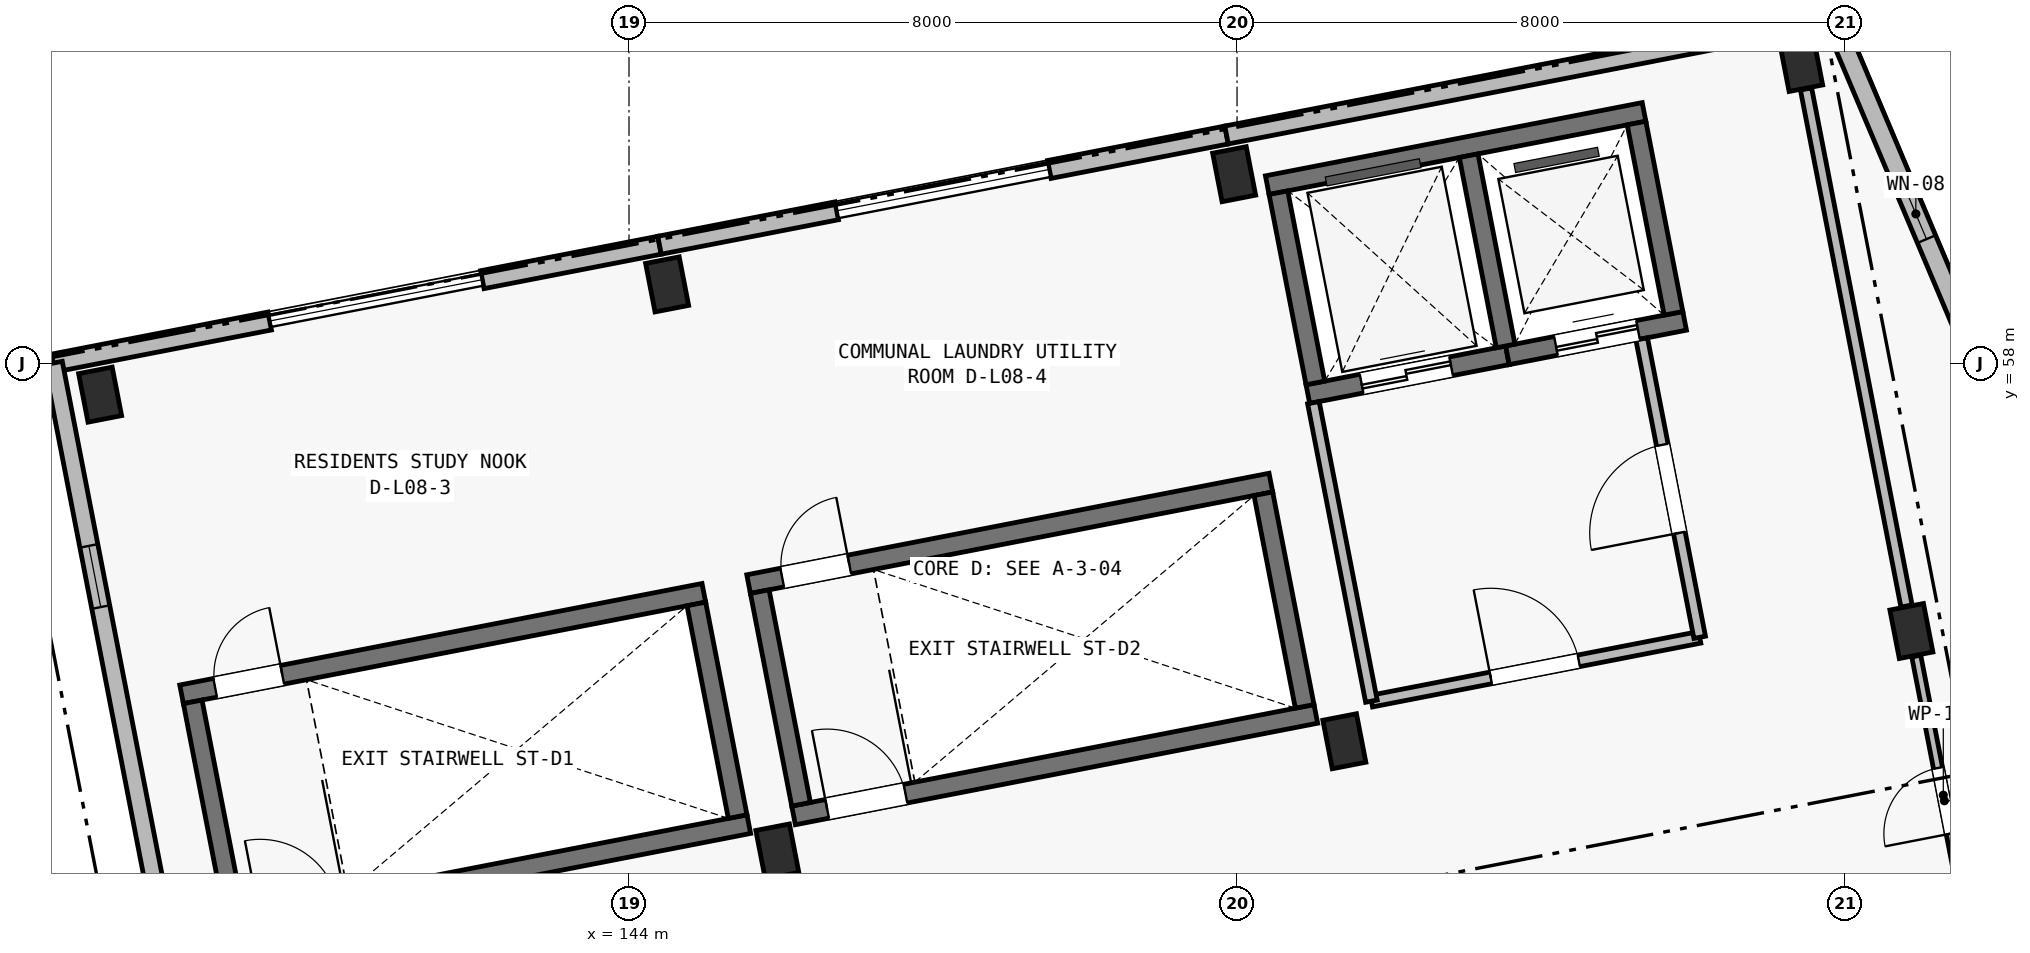
"""IFC4 building model, lengths in metres.
Left out: names, types, materials, properties, quantities, classifications, styles, units other than length and angle.
Written with IfcOpenShell. Run it as: python <this file> out.ifc"""

import sys

from ifc_helpers import new_model, si_unit, direction, frame, frame_2d, origin, origin_2d, place, context, subcontext, project, spatial, polyline, rectangle, outline, extrude, element, fill, save


model = new_model("IFC4")
c1 = context("Model", 3, precision=1e-05, world=origin(), true_north=direction((0.0, 1.0)))
c2 = subcontext(c1, "Body", "Model", "MODEL_VIEW")
j1 = project(units=[si_unit("LENGTHUNIT", "METRE"), si_unit("PLANEANGLEUNIT", "RADIAN")], contexts=[c1])
p1 = place(None, origin())
s1 = spatial("IfcSite", under=j1, at=p1, CompositionType="ELEMENT")
p2 = place(p1, origin())
s2 = spatial("IfcBuilding", under=s1, at=p2, CompositionType="ELEMENT")
p3 = place(p2, frame((0.0, 0.0, 27.9)))
s3 = spatial("IfcBuildingStorey", under=s2, at=p3, CompositionType="ELEMENT", Elevation=27.9)
p4 = place(p3, frame((137.041, 57.59, 0.0), z_axis=(0.0, 0.0, 1.0), x_axis=(0.981627183448, 0.190808995377, 0.0)))
e1 = element("IfcColumn", 1, at=p4, inside=s3, PredefinedType="COLUMN", context=c2, shape_type="SweptSolid", body=[
    extrude(rectangle(XDim=0.45, YDim=0.65, at=origin_2d()), origin(), (0.0, 0.0, 1.0), 3.0),
])
for number, where, z_axis, x_axis in (
    (2, (145.952, 51.58, 0.0), (0.0, 0.0, 1.0), (0.982, 0.191, 0.0)),
    (3, (144.502, 59.041, 0.0), (0.0, 0.0, 1.0), (0.982, 0.191, 0.0)),
    (4, (153.412, 53.03, 0.0), (0.0, 0.0, 1.0), (0.982, 0.191, 0.0)),
    (5, (151.962, 60.491, 0.0), (0.0, 0.0, 1.0), (0.982, 0.191, 0.0)),
):
    element("IfcColumn", number, at=place(p3, frame(where, z_axis=z_axis, x_axis=x_axis)), inside=s3, PredefinedType="COLUMN", context=c2, shape_type="SweptSolid", body=[
        extrude(rectangle(XDim=0.45, YDim=0.65, at=origin_2d()), origin(), (0.0, 0.0, 1.0), 3.25),
    ])
for number, where, z_axis, x_axis in (
    (6, (160.873, 54.48, 0.0), (0.0, 0.0, 1.0), (0.982, 0.191, 0.0)),
    (7, (159.422, 61.941, 0.0), (0.0, 0.0, 1.0), (0.982, 0.191, 0.0)),
):
    element("IfcColumn", number, at=place(p3, frame(where, z_axis=z_axis, x_axis=x_axis)), inside=s3, PredefinedType="COLUMN", context=c2, shape_type="SweptSolid", body=[
        extrude(rectangle(XDim=0.45, YDim=0.65, at=origin_2d()), origin(), (0.0, 0.0, 1.0), 7.468),
    ])
p5 = place(p3, frame((152.397, 60.346, 0.0), z_axis=(0.0, 0.0, 1.0), x_axis=(0.981635261308, 0.190767433692, 0.0)))
e8 = element("IfcWall", 8, at=p5, inside=s3, PredefinedType="SHEAR", context=c2, shape_type="SweptSolid", body=[
    extrude(rectangle(XDim=5.05, YDim=0.25, at=frame_2d((2.525, 0.0))), origin(), (0.0, 0.0, 1.0), 4.35),
])
p6 = place(p3, frame((152.932, 57.598, 0.0), z_axis=(0.0, 0.0, 1.0), x_axis=(0.981636759622, 0.190759723627, 0.0)))
e9 = element("IfcWall", 9, at=p6, inside=s3, PredefinedType="SHEAR", context=c2, shape_type="SweptSolid", body=[
    extrude(rectangle(XDim=2.675, YDim=0.25, at=frame_2d((1.337, 0.0))), origin(), (0.0, 0.0, 1.0), 4.35),
])
p7 = place(p6, frame((0.72, 0.0, 0.0)))
e10 = element("IfcOpeningElement", 10, at=p7, cuts=e9, PredefinedType="OPENING", context=c2, shape_type="SweptSolid", body=[
    extrude(rectangle(XDim=1.2, YDim=2.2, at=frame_2d((0.6, 1.1))), frame((0.0, 0.14, 0.0), z_axis=(0.0, -1.0, 0.0), x_axis=(1.0, 0.0, 0.0)), (0.0, 0.0, 1.0), 0.28),
])
p8 = place(p3, frame((155.558, 58.108, 0.0), z_axis=(0.0, 0.0, 1.0), x_axis=(0.981633573872, 0.190776116556, 0.0)))
e11 = element("IfcWall", 11, at=p8, inside=s3, PredefinedType="SHEAR", context=c2, shape_type="SweptSolid", body=[
    extrude(rectangle(XDim=2.375, YDim=0.25, at=frame_2d((1.188, 0.0))), origin(), (0.0, 0.0, 1.0), 4.35),
])
p9 = place(p8, frame((0.65, 0.0, 0.0)))
e12 = element("IfcOpeningElement", 12, at=p9, cuts=e11, PredefinedType="OPENING", context=c2, shape_type="SweptSolid", body=[
    extrude(rectangle(XDim=1.1, YDim=2.15, at=frame_2d((0.55, 1.075))), frame((0.0, 0.14, 0.0), z_axis=(0.0, -1.0, 0.0), x_axis=(1.0, 0.0, 0.0)), (0.0, 0.0, 1.0), 0.28),
])
for number, where, z_axis, x_axis in (
    (13, (153.031, 57.744, 0.0), (0.0, 0.0, 1.0), (-0.191, 0.982, 0.0)),
    (14, (155.534, 58.231, 0.0), (0.0, 0.0, 1.0), (-0.191, 0.982, 0.0)),
    (15, (157.742, 58.66, 0.0), (0.0, 0.0, 1.0), (-0.191, 0.982, 0.0)),
):
    element("IfcWall", number, at=place(p3, frame(where, z_axis=z_axis, x_axis=x_axis)), inside=s3, PredefinedType="SHEAR", context=c2, shape_type="SweptSolid", body=[
        extrude(rectangle(XDim=2.55, YDim=0.25, at=frame_2d((1.275, 0.0))), origin(), (0.0, 0.0, 1.0), 4.35),
    ])
p10 = place(p3, frame((138.113, 53.647, 0.0), z_axis=(0.0, 0.0, 1.0), x_axis=(0.981626097708, 0.19081458094, 0.0)))
e16 = element("IfcWall", 16, at=p10, inside=s3, PredefinedType="SHEAR", context=c2, shape_type="SweptSolid", body=[
    extrude(rectangle(XDim=7.0, YDim=0.25, at=frame_2d((3.5, 0.0))), origin(), (0.0, 0.0, 1.0), 3.049),
])
p11 = place(p10, frame((0.45, 0.0, 0.0)))
e17 = element("IfcOpeningElement", 17, at=p11, cuts=e16, PredefinedType="OPENING", context=c2, shape_type="SweptSolid", body=[
    extrude(rectangle(XDim=0.9, YDim=2.1, at=frame_2d((0.45, 1.05))), frame((0.0, 0.14, 0.0), z_axis=(0.0, -1.0, 0.0), x_axis=(1.0, 0.0, 0.0)), (0.0, 0.0, 1.0), 0.28),
])
p12 = place(p3, frame((138.705, 50.604, 0.0), z_axis=(0.0, 0.0, 1.0), x_axis=(0.981626097708, 0.19081458094, 0.0)))
e18 = element("IfcWall", 18, at=p12, inside=s3, PredefinedType="SHEAR", context=c2, shape_type="SweptSolid", body=[
    extrude(rectangle(XDim=7.0, YDim=0.25, at=frame_2d((3.5, 0.0))), origin(), (0.0, 0.0, 1.0), 3.049),
])
p13 = place(p12, frame((0.45, 0.0, 0.0)))
e19 = element("IfcOpeningElement", 19, at=p13, cuts=e18, PredefinedType="OPENING", context=c2, shape_type="SweptSolid", body=[
    extrude(rectangle(XDim=1.05, YDim=2.15, at=frame_2d((0.525, 1.075))), frame((0.0, 0.14, 0.0), z_axis=(0.0, -1.0, 0.0), x_axis=(1.0, 0.0, 0.0)), (0.0, 0.0, 1.0), 0.28),
])
p14 = place(p3, frame((138.804, 50.751, 0.0), z_axis=(0.0, 0.0, 1.0), x_axis=(-0.190858194834, 0.981617618762, 0.0)))
e20 = element("IfcWall", 20, at=p14, inside=s3, PredefinedType="SHEAR", context=c2, shape_type="SweptSolid", body=[
    extrude(rectangle(XDim=2.85, YDim=0.25, at=frame_2d((1.425, 0.0))), origin(), (0.0, 0.0, 1.0), 3.049),
])
p15 = place(p3, frame((145.43, 52.039, 0.0), z_axis=(0.0, 0.0, 1.0), x_axis=(-0.190842147128, 0.981620738819, 0.0)))
e21 = element("IfcWall", 21, at=p15, inside=s3, PredefinedType="SHEAR", context=c2, shape_type="SweptSolid", body=[
    extrude(rectangle(XDim=2.85, YDim=0.25, at=frame_2d((1.425, 0.0))), origin(), (0.0, 0.0, 1.0), 3.049),
])
p16 = place(p3, frame((145.574, 55.098, 0.0), z_axis=(0.0, 0.0, 1.0), x_axis=(0.981626097708, 0.19081458094, 0.0)))
e22 = element("IfcWall", 22, at=p16, inside=s3, PredefinedType="SHEAR", context=c2, shape_type="SweptSolid", body=[
    extrude(rectangle(XDim=7.0, YDim=0.25, at=frame_2d((3.5, 0.0))), origin(), (0.0, 0.0, 1.0), 3.25),
])
p17 = place(p16, frame((0.45, 0.0, 0.0)))
e23 = element("IfcOpeningElement", 23, at=p17, cuts=e22, PredefinedType="OPENING", context=c2, shape_type="SweptSolid", body=[
    extrude(rectangle(XDim=0.9, YDim=2.1, at=frame_2d((0.45, 1.05))), frame((0.0, 0.14, 0.0), z_axis=(0.0, -1.0, 0.0), x_axis=(1.0, 0.0, 0.0)), (0.0, 0.0, 1.0), 0.28),
])
p18 = place(p3, frame((146.165, 52.054, 0.0), z_axis=(0.0, 0.0, 1.0), x_axis=(0.981627367538, 0.190808048312, 0.0)))
e24 = element("IfcWall", 24, at=p18, inside=s3, PredefinedType="SHEAR", context=c2, shape_type="SweptSolid", body=[
    extrude(rectangle(XDim=7.0, YDim=0.25, at=frame_2d((3.5, 0.0))), origin(), (0.0, 0.0, 1.0), 3.25),
])
p19 = place(p18, frame((0.45, 0.0, 0.0)))
e25 = element("IfcOpeningElement", 25, at=p19, cuts=e24, PredefinedType="OPENING", context=c2, shape_type="SweptSolid", body=[
    extrude(rectangle(XDim=1.05, YDim=2.15, at=frame_2d((0.525, 1.075))), frame((0.0, 0.14, 0.0), z_axis=(0.0, -1.0, 0.0), x_axis=(1.0, 0.0, 0.0)), (0.0, 0.0, 1.0), 0.28),
])
for number, where, z_axis, x_axis in (
    (26, (146.264, 52.201, 0.0), (0.0, 0.0, 1.0), (-0.191, 0.982, 0.0)),
    (27, (152.89, 53.489, 0.0), (0.0, 0.0, 1.0), (-0.191, 0.982, 0.0)),
):
    element("IfcWall", number, at=place(p3, frame(where, z_axis=z_axis, x_axis=x_axis)), inside=s3, PredefinedType="SHEAR", context=c2, shape_type="SweptSolid", body=[
        extrude(rectangle(XDim=2.85, YDim=0.25, at=frame_2d((1.425, 0.0))), origin(), (0.0, 0.0, 1.0), 3.25),
    ])
p20 = place(p3, frame((136.426, 58.006, 0.0), z_axis=(0.0, 0.0, 1.0), x_axis=(0.981634663451, 0.190770510067, 0.0)))
e28 = element("IfcWall", 28, at=p20, inside=s3, PredefinedType="SOLIDWALL", context=c2, shape_type="SweptSolid", body=[
    extrude(outline(polyline([(0.0, 0.0), (2.9, 0.0), (2.9, 3.905), (0.0, 3.305), (0.0, 0.0)])), frame((0.0, 0.12, 0.0), z_axis=(0.0, -1.0, 0.0), x_axis=(1.0, 0.0, 0.0)), (0.0, 0.0, 1.0), 0.24),
])
p21 = place(p3, frame((142.07, 59.103, 0.0), z_axis=(0.0, 0.0, 1.0), x_axis=(0.981629832251, 0.190795367961, 0.0)))
e29 = element("IfcWall", 29, at=p21, inside=s3, PredefinedType="SOLIDWALL", context=c2, shape_type="SweptSolid", body=[
    extrude(outline(polyline([(0.0, 0.0), (2.375, 0.0), (2.375, 4.987), (0.0, 4.495), (0.0, 0.0)])), frame((0.0, 0.12, 0.0), z_axis=(0.0, -1.0, 0.0), x_axis=(1.0, 0.0, 0.0)), (0.0, 0.0, 1.0), 0.24),
])
p22 = place(p3, frame((144.401, 59.556, 0.0), z_axis=(0.0, 0.0, 1.0), x_axis=(0.981633573872, 0.190776116556, 0.0)))
e30 = element("IfcWall", 30, at=p22, inside=s3, PredefinedType="SOLIDWALL", context=c2, shape_type="SweptSolid", body=[
    extrude(outline(polyline([(0.0, 0.0), (2.375, 0.0), (2.375, 5.478), (0.0, 4.987), (0.0, 0.0)])), frame((0.0, 0.12, 0.0), z_axis=(0.0, -1.0, 0.0), x_axis=(1.0, 0.0, 0.0)), (0.0, 0.0, 1.0), 0.24),
])
p23 = place(p3, frame((149.531, 60.553, 0.0), z_axis=(0.0, 0.0, 1.0), x_axis=(0.98161057432, 0.190894422087, 0.0)))
e31 = element("IfcWall", 31, at=p23, inside=s3, PredefinedType="SOLIDWALL", context=c2, shape_type="SweptSolid", body=[
    extrude(outline(polyline([(0.0, 0.0), (2.375, 0.0), (2.375, 6.56), (0.0, 6.068), (0.0, 0.0)])), frame((0.0, 0.12, 0.0), z_axis=(0.0, -1.0, 0.0), x_axis=(1.0, 0.0, 0.0)), (0.0, 0.0, 1.0), 0.24),
])
p24 = place(p3, frame((151.862, 61.006, 0.0), z_axis=(0.0, 0.0, 1.0), x_axis=(0.981627273155, 0.190808533872, 0.0)))
e32 = element("IfcWall", 32, at=p24, inside=s3, PredefinedType="SOLIDWALL", context=c2, shape_type="SweptSolid", body=[
    extrude(outline(polyline([(0.0, 0.0), (8.125, 0.0), (8.125, 8.241), (0.0, 6.56), (0.0, 0.0)])), frame((0.0, 0.12, 0.0), z_axis=(0.0, -1.0, 0.0), x_axis=(1.0, 0.0, 0.0)), (0.0, 0.0, 1.0), 0.24),
])
p25 = place(p3, frame((140.366, 37.735, 0.0), z_axis=(0.0, 0.0, 1.0), x_axis=(-0.190806686307, 0.981627632282, 0.0)))
e33 = element("IfcWall", 33, at=p25, inside=s3, PredefinedType="SOLIDWALL", context=c2, shape_type="SweptSolid", body=[
    extrude(rectangle(XDim=20.65, YDim=0.24, at=frame_2d((10.325, 0.0))), origin(), (0.0, 0.0, 1.0), 3.305),
])
p26 = place(p25, frame((2.45, 0.0, 0.45)))
e34 = element("IfcOpeningElement", 34, at=p26, cuts=e33, PredefinedType="OPENING", context=c2, shape_type="SweptSolid", body=[
    extrude(rectangle(XDim=0.68, YDim=2.24, at=frame_2d((0.34, 1.12))), frame((0.0, 0.135, 0.0), z_axis=(0.0, -1.0, 0.0), x_axis=(1.0, 0.0, 0.0)), (0.0, 0.0, 1.0), 0.27),
])
p27 = place(p25, frame((17.38, 0.0, 0.52)))
e35 = element("IfcOpeningElement", 35, at=p27, cuts=e33, PredefinedType="OPENING", context=c2, shape_type="SweptSolid", body=[
    extrude(rectangle(XDim=0.82, YDim=2.18, at=frame_2d((0.41, 1.09))), frame((0.0, 0.135, 0.0), z_axis=(0.0, -1.0, 0.0), x_axis=(1.0, 0.0, 0.0)), (0.0, 0.0, 1.0), 0.27),
])
p28 = place(p3, frame((159.837, 62.556, 0.0), z_axis=(0.0, 0.0, 1.0), x_axis=(0.389225507936, -0.921142499276, 0.0)))
e36 = element("IfcWall", 36, at=p28, inside=s3, PredefinedType="SOLIDWALL", context=c2, shape_type="SweptSolid", body=[
    extrude(outline(polyline([(0.0, 0.0), (17.91, 0.0), (17.91, 9.006), (0.0, 8.241), (0.0, 0.0)])), frame((0.0, 0.13, 0.0), z_axis=(0.0, -1.0, 0.0), x_axis=(1.0, 0.0, 0.0)), (0.0, 0.0, 1.0), 0.26),
])
p29 = place(p28, frame((2.45, 0.0, 0.45)))
e37 = element("IfcOpeningElement", 37, at=p29, cuts=e36, PredefinedType="OPENING", context=c2, shape_type="SweptSolid", body=[
    extrude(rectangle(XDim=0.72, YDim=2.16, at=frame_2d((0.36, 1.08))), frame((0.0, 0.145, 0.0), z_axis=(0.0, -1.0, 0.0), x_axis=(1.0, 0.0, 0.0)), (0.0, 0.0, 1.0), 0.29),
])
p30 = place(p28, frame((14.6, 0.0, 0.52)))
e38 = element("IfcOpeningElement", 38, at=p30, cuts=e36, PredefinedType="OPENING", context=c2, shape_type="SweptSolid", body=[
    extrude(rectangle(XDim=0.86, YDim=2.36, at=frame_2d((0.43, 1.18))), frame((0.0, 0.145, 0.0), z_axis=(0.0, -1.0, 0.0), x_axis=(1.0, 0.0, 0.0)), (0.0, 0.0, 1.0), 0.29),
])
p31 = place(p3, frame((153.768, 53.558, 0.0), z_axis=(0.0, 0.0, 1.0), x_axis=(0.981624918225, 0.190820648566, 0.0)))
e39 = element("IfcWall", 39, at=p31, inside=s3, PredefinedType="PARTITIONING", context=c2, shape_type="SweptSolid", body=[
    extrude(rectangle(XDim=4.4, YDim=0.155, at=frame_2d((2.2, 0.0))), origin(), (0.0, 0.0, 1.0), 3.15),
])
p32 = place(p31, frame((1.6, 0.0, 0.0)))
e40 = element("IfcOpeningElement", 40, at=p32, cuts=e39, PredefinedType="OPENING", context=c2, shape_type="SweptSolid", body=[
    extrude(rectangle(XDim=1.18, YDim=2.15, at=frame_2d((0.59, 1.075))), frame((0.0, 0.093, 0.0), z_axis=(0.0, -1.0, 0.0), x_axis=(1.0, 0.0, 0.0)), (0.0, 0.0, 1.0), 0.185),
])
p33 = place(p3, frame((153.768, 53.558, 0.0), z_axis=(0.0, 0.0, 1.0), x_axis=(-0.19085495634, 0.981618248425, 0.0)))
e41 = element("IfcWall", 41, at=p33, inside=s3, PredefinedType="PARTITIONING", context=c2, shape_type="SweptSolid", body=[
    extrude(rectangle(XDim=4.0, YDim=0.155, at=frame_2d((2.0, 0.0))), origin(), (0.0, 0.0, 1.0), 3.15),
])
p34 = place(p3, frame((158.087, 54.397, 0.0), z_axis=(0.0, 0.0, 1.0), x_axis=(-0.190796144009, 0.981629681413, 0.0)))
e42 = element("IfcWall", 42, at=p34, inside=s3, PredefinedType="PARTITIONING", context=c2, shape_type="SweptSolid", body=[
    extrude(rectangle(XDim=4.0, YDim=0.155, at=frame_2d((2.0, 0.0))), origin(), (0.0, 0.0, 1.0), 3.15),
])
p35 = place(p34, frame((1.4, 0.0, 0.0)))
e43 = element("IfcOpeningElement", 43, at=p35, cuts=e42, PredefinedType="OPENING", context=c2, shape_type="SweptSolid", body=[
    extrude(rectangle(XDim=1.18, YDim=2.15, at=frame_2d((0.59, 1.075))), frame((0.0, 0.093, 0.0), z_axis=(0.0, -1.0, 0.0), x_axis=(1.0, 0.0, 0.0)), (0.0, 0.0, 1.0), 0.185),
])
p36 = place(p3, frame((161.648, 50.49, 0.0), z_axis=(0.0, 0.0, 1.0), x_axis=(-0.190789073686, 0.981631055622, 0.0)))
e44 = element("IfcWall", 44, at=p36, inside=s3, PredefinedType="PARTITIONING", context=c2, shape_type="SweptSolid", body=[
    extrude(rectangle(XDim=3.73, YDim=0.12, at=frame_2d((1.865, 0.0))), origin(), (0.0, 0.0, 1.0), 2.6),
])
p37 = place(p36, frame((1.35, 0.0, 0.0)))
e45 = element("IfcOpeningElement", 45, at=p37, cuts=e44, PredefinedType="OPENING", context=c2, shape_type="SweptSolid", body=[
    extrude(rectangle(XDim=0.88, YDim=2.1, at=frame_2d((0.44, 1.05))), frame((0.0, 0.075, 0.0), z_axis=(0.0, -1.0, 0.0), x_axis=(1.0, 0.0, 0.0)), (0.0, 0.0, 1.0), 0.15),
])
p38 = place(p3, frame((160.809, 54.809, 0.0), z_axis=(0.0, 0.0, 1.0), x_axis=(-0.190808365525, 0.981627305878, 0.0)))
e46 = element("IfcWall", 46, at=p38, inside=s3, PredefinedType="PARTITIONING", context=c2, shape_type="SweptSolid", body=[
    extrude(rectangle(XDim=6.93, YDim=0.15, at=frame_2d((3.465, 0.0))), origin(), (0.0, 0.0, 1.0), 2.6),
])
p39 = place(p27, origin())
e47 = element("IfcWindow", 47, at=p39, inside=s3, PartitioningType="SINGLE_PANEL", PredefinedType="WINDOW", context=c2, shape_type="SweptSolid", body=[
    extrude(rectangle(XDim=0.82, YDim=2.18, at=frame_2d((0.41, 1.09))), frame((0.0, 0.03, 0.0), z_axis=(0.0, -1.0, 0.0), x_axis=(1.0, 0.0, 0.0)), (0.0, 0.0, 1.0), 0.06),
])
fill(e35, e47)
p40 = place(p29, origin())
e48 = element("IfcWindow", 48, at=p40, inside=s3, PartitioningType="SINGLE_PANEL", PredefinedType="WINDOW", context=c2, shape_type="SweptSolid", body=[
    extrude(rectangle(XDim=0.72, YDim=2.16, at=frame_2d((0.36, 1.08))), frame((0.0, 0.03, 0.0), z_axis=(0.0, -1.0, 0.0), x_axis=(1.0, 0.0, 0.0)), (0.0, 0.0, 1.0), 0.06),
])
fill(e37, e48)
p41 = place(p32, origin())
e49 = element("IfcDoor", 49, at=p41, inside=s3, OperationType="SINGLE_SWING_LEFT", PredefinedType="DOOR", context=c2, shape_type="SweptSolid", body=[
    extrude(rectangle(XDim=1.18, YDim=2.15, at=frame_2d((0.59, 1.075))), frame((0.0, 0.025, 0.0), z_axis=(0.0, -1.0, 0.0), x_axis=(1.0, 0.0, 0.0)), (0.0, 0.0, 1.0), 0.05),
])
fill(e40, e49)
p42 = place(p35, origin())
e50 = element("IfcDoor", 50, at=p42, inside=s3, OperationType="SINGLE_SWING_LEFT", PredefinedType="DOOR", context=c2, shape_type="SweptSolid", body=[
    extrude(rectangle(XDim=1.18, YDim=2.15, at=frame_2d((0.59, 1.075))), frame((0.0, 0.025, 0.0), z_axis=(0.0, -1.0, 0.0), x_axis=(1.0, 0.0, 0.0)), (0.0, 0.0, 1.0), 0.05),
])
fill(e43, e50)
p43 = place(p37, origin())
e51 = element("IfcDoor", 51, at=p43, inside=s3, OperationType="SINGLE_SWING_LEFT", PredefinedType="DOOR", context=c2, shape_type="SweptSolid", body=[
    extrude(rectangle(XDim=0.88, YDim=2.1, at=frame_2d((0.44, 1.05))), frame((0.0, 0.025, 0.0), z_axis=(0.0, -1.0, 0.0), x_axis=(1.0, 0.0, 0.0)), (0.0, 0.0, 1.0), 0.05),
])
fill(e45, e51)
p44 = place(p11, origin())
e52 = element("IfcDoor", 52, at=p44, inside=s3, OperationType="SINGLE_SWING_RIGHT", PredefinedType="DOOR", context=c2, shape_type="SweptSolid", body=[
    extrude(rectangle(XDim=0.9, YDim=2.1, at=frame_2d((0.45, 1.05))), frame((0.0, 0.025, 0.0), z_axis=(0.0, -1.0, 0.0), x_axis=(1.0, 0.0, 0.0)), (0.0, 0.0, 1.0), 0.05),
])
fill(e17, e52)
p45 = place(p19, origin())
e53 = element("IfcDoor", 53, at=p45, inside=s3, OperationType="SINGLE_SWING_LEFT", PredefinedType="DOOR", context=c2, shape_type="SweptSolid", body=[
    extrude(rectangle(XDim=1.05, YDim=2.15, at=frame_2d((0.525, 1.075))), frame((0.0, 0.025, 0.0), z_axis=(0.0, -1.0, 0.0), x_axis=(1.0, 0.0, 0.0)), (0.0, 0.0, 1.0), 0.05),
])
fill(e25, e53)
p46 = place(p17, origin())
e54 = element("IfcDoor", 54, at=p46, inside=s3, OperationType="SINGLE_SWING_RIGHT", PredefinedType="DOOR", context=c2, shape_type="SweptSolid", body=[
    extrude(rectangle(XDim=0.9, YDim=2.1, at=frame_2d((0.45, 1.05))), frame((0.0, 0.025, 0.0), z_axis=(0.0, -1.0, 0.0), x_axis=(1.0, 0.0, 0.0)), (0.0, 0.0, 1.0), 0.05),
])
fill(e23, e54)
p47 = place(p7, origin())
e55 = element("IfcDoor", 55, at=p47, inside=s3, OperationType="DOUBLE_DOOR_SLIDING", PredefinedType="DOOR", context=c2, shape_type="SweptSolid", body=[
    extrude(rectangle(XDim=1.2, YDim=2.2, at=frame_2d((0.6, 1.1))), frame((0.0, 0.025, 0.0), z_axis=(0.0, -1.0, 0.0), x_axis=(1.0, 0.0, 0.0)), (0.0, 0.0, 1.0), 0.05),
])
fill(e10, e55)
p48 = place(p9, origin())
e56 = element("IfcDoor", 56, at=p48, inside=s3, OperationType="DOUBLE_DOOR_SLIDING", PredefinedType="DOOR", context=c2, shape_type="SweptSolid", body=[
    extrude(rectangle(XDim=1.1, YDim=2.15, at=frame_2d((0.55, 1.075))), frame((0.0, 0.025, 0.0), z_axis=(0.0, -1.0, 0.0), x_axis=(1.0, 0.0, 0.0)), (0.0, 0.0, 1.0), 0.05),
])
fill(e12, e56)
save(model, sys.argv[1])
